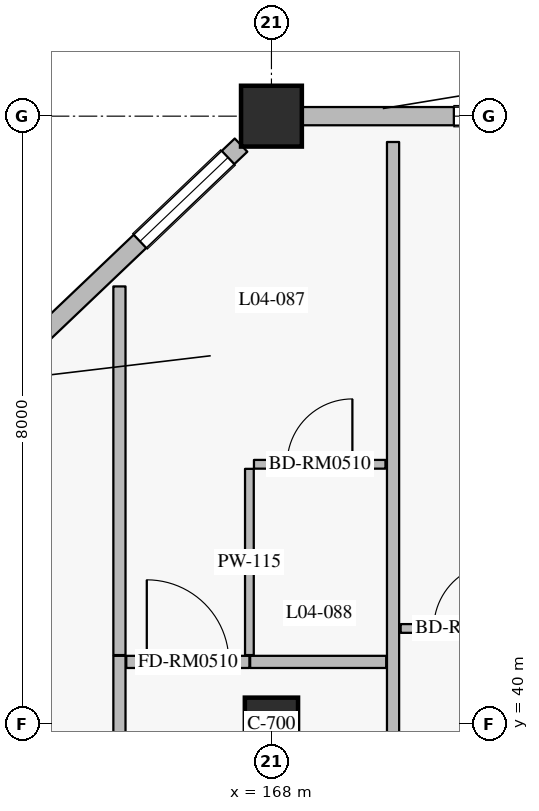
"""IFC4 building model, lengths in metres.
Left out: names, types, materials, properties, quantities, classifications, styles, units other than length and angle.
Written with IfcOpenShell. Run it as: python <this file> out.ifc"""

import sys

from ifc_helpers import new_model, si_unit, direction, frame, frame_2d, origin, origin_2d, place, context, subcontext, project, spatial, rectangle, extrude, element, fill, save


model = new_model("IFC4")
c1 = context("Model", 3, precision=1e-05, world=origin(), true_north=direction((0.0, 1.0)))
c2 = subcontext(c1, "Body", "Model", "MODEL_VIEW")
j1 = project(units=[si_unit("LENGTHUNIT", "METRE"), si_unit("PLANEANGLEUNIT", "RADIAN")], contexts=[c1])
p1 = place(None, origin())
s1 = spatial("IfcSite", under=j1, at=p1, CompositionType="ELEMENT")
p2 = place(p1, origin())
s2 = spatial("IfcBuilding", under=s1, at=p2, CompositionType="ELEMENT")
p3 = place(p2, frame((0.0, 0.0, 21.0)))
s3 = spatial("IfcBuildingStorey", under=s2, at=p3, CompositionType="ELEMENT", Elevation=21.0)
p4 = place(p3, frame((168.0, 48.0, 0.0), z_axis=(0.0, 0.0, 1.0), x_axis=(1.0, 0.0, 0.0)))
e1 = element("IfcColumn", 1, at=p4, inside=s3, PredefinedType="COLUMN", context=c2, shape_type="SweptSolid", body=[
    extrude(rectangle(XDim=0.8, YDim=0.8, at=origin_2d()), origin(), (0.0, 0.0, 1.0), 4.2),
])
p5 = place(p3, frame((168.0, 40.0, 0.0), z_axis=(0.0, 0.0, 1.0), x_axis=(1.0, 0.0, 0.0)))
e2 = element("IfcColumn", 2, at=p5, inside=s3, PredefinedType="COLUMN", context=c2, shape_type="SweptSolid", body=[
    extrude(rectangle(XDim=0.7, YDim=0.7, at=origin_2d()), origin(), (0.0, 0.0, 1.0), 4.2),
])
p6 = place(p3, frame((160.0, 40.381, 0.0), z_axis=(0.0, 0.0, 1.0), x_axis=(0.724156739794, 0.689635422677, 0.0)))
e3 = element("IfcWall", 3, at=p6, inside=s3, PredefinedType="SOLIDWALL", context=c2, shape_type="SweptSolid", body=[
    extrude(rectangle(XDim=10.495, YDim=0.24, at=frame_2d((5.248, 0.0))), origin(), (0.0, 0.0, 1.0), 3.53),
])
p7 = place(p6, frame((0.926, 0.0, 0.8)))
e4 = element("IfcOpeningElement", 4, at=p7, cuts=e3, PredefinedType="OPENING", context=c2, shape_type="SweptSolid", body=[
    extrude(rectangle(XDim=1.6, YDim=1.6, at=frame_2d((0.8, 0.8))), frame((0.0, 0.13, 0.0), z_axis=(0.0, -1.0, 0.0), x_axis=(1.0, 0.0, 0.0)), (0.0, 0.0, 1.0), 0.26),
])
p8 = place(p6, frame((5.138, 0.0, 0.8)))
e5 = element("IfcOpeningElement", 5, at=p8, cuts=e3, PredefinedType="OPENING", context=c2, shape_type="SweptSolid", body=[
    extrude(rectangle(XDim=1.6, YDim=1.6, at=frame_2d((0.8, 0.8))), frame((0.0, 0.13, 0.0), z_axis=(0.0, -1.0, 0.0), x_axis=(1.0, 0.0, 0.0)), (0.0, 0.0, 1.0), 0.26),
])
p9 = place(p6, frame((8.659, 0.0, 0.8)))
e6 = element("IfcOpeningElement", 6, at=p9, cuts=e3, PredefinedType="OPENING", context=c2, shape_type="SweptSolid", body=[
    extrude(rectangle(XDim=1.6, YDim=1.6, at=frame_2d((0.8, 0.8))), frame((0.0, 0.13, 0.0), z_axis=(0.0, -1.0, 0.0), x_axis=(1.0, 0.0, 0.0)), (0.0, 0.0, 1.0), 0.26),
])
p10 = place(p3, frame((168.4, 48.0, 0.0), z_axis=(0.0, 0.0, 1.0), x_axis=(1.0, 0.0, 0.0)))
e7 = element("IfcWall", 7, at=p10, inside=s3, PredefinedType="SOLIDWALL", context=c2, shape_type="SweptSolid", body=[
    extrude(rectangle(XDim=7.6, YDim=0.24, at=frame_2d((3.8, 0.0))), origin(), (0.0, 0.0, 1.0), 3.53),
])
p11 = place(p10, frame((2.0, 0.0, 0.8)))
e8 = element("IfcOpeningElement", 8, at=p11, cuts=e7, PredefinedType="OPENING", context=c2, shape_type="SweptSolid", body=[
    extrude(rectangle(XDim=2.0, YDim=1.75, at=frame_2d((1.0, 0.875))), frame((0.0, 0.13, 0.0), z_axis=(0.0, -1.0, 0.0), x_axis=(1.0, 0.0, 0.0)), (0.0, 0.0, 1.0), 0.26),
])
p12 = place(p10, frame((5.25, 0.0, 0.8)))
e9 = element("IfcOpeningElement", 9, at=p12, cuts=e7, PredefinedType="OPENING", context=c2, shape_type="SweptSolid", body=[
    extrude(rectangle(XDim=2.0, YDim=1.75, at=frame_2d((1.0, 0.875))), frame((0.0, 0.13, 0.0), z_axis=(0.0, -1.0, 0.0), x_axis=(1.0, 0.0, 0.0)), (0.0, 0.0, 1.0), 0.26),
])
p13 = place(p3, frame((166.0, 32.26, 0.0), z_axis=(0.0, 0.0, 1.0), x_axis=(0.0, 1.0, 0.0)))
e10 = element("IfcWall", 10, at=p13, inside=s3, PredefinedType="PARTITIONING", context=c2, shape_type="SweptSolid", body=[
    extrude(rectangle(XDim=8.64, YDim=0.16, at=frame_2d((4.32, 0.0))), origin(), (0.0, 0.0, 1.0), 3.965),
])
p14 = place(p3, frame((166.09, 40.82, 0.0), z_axis=(0.0, 0.0, 1.0), x_axis=(1.0, 0.0, 0.0)))
e11 = element("IfcWall", 11, at=p14, inside=s3, PredefinedType="PARTITIONING", context=c2, shape_type="SweptSolid", body=[
    extrude(rectangle(XDim=1.62, YDim=0.16, at=frame_2d((0.81, 0.0))), origin(), (0.0, 0.0, 1.0), 3.965),
])
p15 = place(p14, frame((0.27, 0.0, 0.0)))
e12 = element("IfcOpeningElement", 12, at=p15, cuts=e11, PredefinedType="OPENING", context=c2, shape_type="SweptSolid", body=[
    extrude(rectangle(XDim=1.08, YDim=2.3, at=frame_2d((0.54, 1.15))), frame((0.0, 0.09, 0.0), z_axis=(0.0, -1.0, 0.0), x_axis=(1.0, 0.0, 0.0)), (0.0, 0.0, 1.0), 0.18),
])
p16 = place(p3, frame((167.72, 40.82, 0.0), z_axis=(0.0, 0.0, 1.0), x_axis=(1.0, 0.0, 0.0)))
e13 = element("IfcWall", 13, at=p16, inside=s3, PredefinedType="PARTITIONING", context=c2, shape_type="SweptSolid", body=[
    extrude(rectangle(XDim=1.79, YDim=0.16, at=frame_2d((0.895, 0.0))), origin(), (0.0, 0.0, 1.0), 3.965),
])
p17 = place(p3, frame((167.71, 40.91, 0.0), z_axis=(0.0, 0.0, 1.0), x_axis=(0.0, 1.0, 0.0)))
e14 = element("IfcWall", 14, at=p17, inside=s3, PredefinedType="PARTITIONING", context=c2, shape_type="SweptSolid", body=[
    extrude(rectangle(XDim=2.45, YDim=0.115, at=frame_2d((1.225, 0.0))), origin(), (0.0, 0.0, 1.0), 3.965),
])
p18 = place(p3, frame((167.77, 43.42, 0.0), z_axis=(0.0, 0.0, 1.0), x_axis=(1.0, 0.0, 0.0)))
e15 = element("IfcWall", 15, at=p18, inside=s3, PredefinedType="PARTITIONING", context=c2, shape_type="SweptSolid", body=[
    extrude(rectangle(XDim=1.73, YDim=0.115, at=frame_2d((0.865, 0.0))), origin(), (0.0, 0.0, 1.0), 3.965),
])
p19 = place(p18, frame((0.435, 0.0, 0.0)))
e16 = element("IfcOpeningElement", 16, at=p19, cuts=e15, PredefinedType="OPENING", context=c2, shape_type="SweptSolid", body=[
    extrude(rectangle(XDim=0.86, YDim=2.12, at=frame_2d((0.43, 1.06))), frame((0.0, 0.067, 0.0), z_axis=(0.0, -1.0, 0.0), x_axis=(1.0, 0.0, 0.0)), (0.0, 0.0, 1.0), 0.135),
])
p20 = place(p3, frame((166.0, 40.91, 0.0), z_axis=(0.0, 0.0, 1.0), x_axis=(0.0, 1.0, 0.0)))
e17 = element("IfcWall", 17, at=p20, inside=s3, PredefinedType="PARTITIONING", context=c2, shape_type="SweptSolid", body=[
    extrude(rectangle(XDim=4.85, YDim=0.16, at=frame_2d((2.425, 0.0))), origin(), (0.0, 0.0, 1.0), 3.965),
])
p21 = place(p3, frame((169.7, 41.26, 0.0), z_axis=(0.0, 0.0, 1.0), x_axis=(1.0, 0.0, 0.0)))
e18 = element("IfcWall", 18, at=p21, inside=s3, PredefinedType="PARTITIONING", context=c2, shape_type="SweptSolid", body=[
    extrude(rectangle(XDim=1.73, YDim=0.115, at=frame_2d((0.865, 0.0))), origin(), (0.0, 0.0, 1.0), 3.965),
])
p22 = place(p21, frame((0.435, 0.0, 0.0)))
e19 = element("IfcOpeningElement", 19, at=p22, cuts=e18, PredefinedType="OPENING", context=c2, shape_type="SweptSolid", body=[
    extrude(rectangle(XDim=0.86, YDim=2.12, at=frame_2d((0.43, 1.06))), frame((0.0, 0.067, 0.0), z_axis=(0.0, -1.0, 0.0), x_axis=(1.0, 0.0, 0.0)), (0.0, 0.0, 1.0), 0.135),
])
p23 = place(p3, frame((169.6, 38.75, 0.0), z_axis=(0.0, 0.0, 1.0), x_axis=(0.0, 1.0, 0.0)))
e20 = element("IfcWall", 20, at=p23, inside=s3, PredefinedType="PARTITIONING", context=c2, shape_type="SweptSolid", body=[
    extrude(rectangle(XDim=8.91, YDim=0.16, at=frame_2d((4.455, 0.0))), origin(), (0.0, 0.0, 1.0), 3.965),
])
p24 = place(p9, origin())
e21 = element("IfcWindow", 21, at=p24, inside=s3, PartitioningType="SINGLE_PANEL", PredefinedType="WINDOW", context=c2, shape_type="SweptSolid", body=[
    extrude(rectangle(XDim=1.6, YDim=1.6, at=frame_2d((0.8, 0.8))), frame((0.0, 0.03, 0.0), z_axis=(0.0, -1.0, 0.0), x_axis=(1.0, 0.0, 0.0)), (0.0, 0.0, 1.0), 0.06),
])
fill(e6, e21)
p25 = place(p11, origin())
e22 = element("IfcWindow", 22, at=p25, inside=s3, PartitioningType="DOUBLE_PANEL_VERTICAL", PredefinedType="WINDOW", context=c2, shape_type="SweptSolid", body=[
    extrude(rectangle(XDim=2.0, YDim=1.75, at=frame_2d((1.0, 0.875))), frame((0.0, 0.03, 0.0), z_axis=(0.0, -1.0, 0.0), x_axis=(1.0, 0.0, 0.0)), (0.0, 0.0, 1.0), 0.06),
])
fill(e8, e22)
p26 = place(p15, origin())
e23 = element("IfcDoor", 23, at=p26, inside=s3, OperationType="SINGLE_SWING_LEFT", PredefinedType="DOOR", context=c2, shape_type="SweptSolid", body=[
    extrude(rectangle(XDim=1.08, YDim=2.3, at=frame_2d((0.54, 1.15))), frame((0.0, 0.025, 0.0), z_axis=(0.0, -1.0, 0.0), x_axis=(1.0, 0.0, 0.0)), (0.0, 0.0, 1.0), 0.05),
])
fill(e12, e23)
p27 = place(p19, origin())
e24 = element("IfcDoor", 24, at=p27, inside=s3, OperationType="SINGLE_SWING_RIGHT", PredefinedType="DOOR", context=c2, shape_type="SweptSolid", body=[
    extrude(rectangle(XDim=0.86, YDim=2.12, at=frame_2d((0.43, 1.06))), frame((0.0, 0.025, 0.0), z_axis=(0.0, -1.0, 0.0), x_axis=(1.0, 0.0, 0.0)), (0.0, 0.0, 1.0), 0.05),
])
fill(e16, e24)
p28 = place(p22, origin())
e25 = element("IfcDoor", 25, at=p28, inside=s3, OperationType="SINGLE_SWING_RIGHT", PredefinedType="DOOR", context=c2, shape_type="SweptSolid", body=[
    extrude(rectangle(XDim=0.86, YDim=2.12, at=frame_2d((0.43, 1.06))), frame((0.0, 0.025, 0.0), z_axis=(0.0, -1.0, 0.0), x_axis=(1.0, 0.0, 0.0)), (0.0, 0.0, 1.0), 0.05),
])
fill(e19, e25)
save(model, sys.argv[1])
